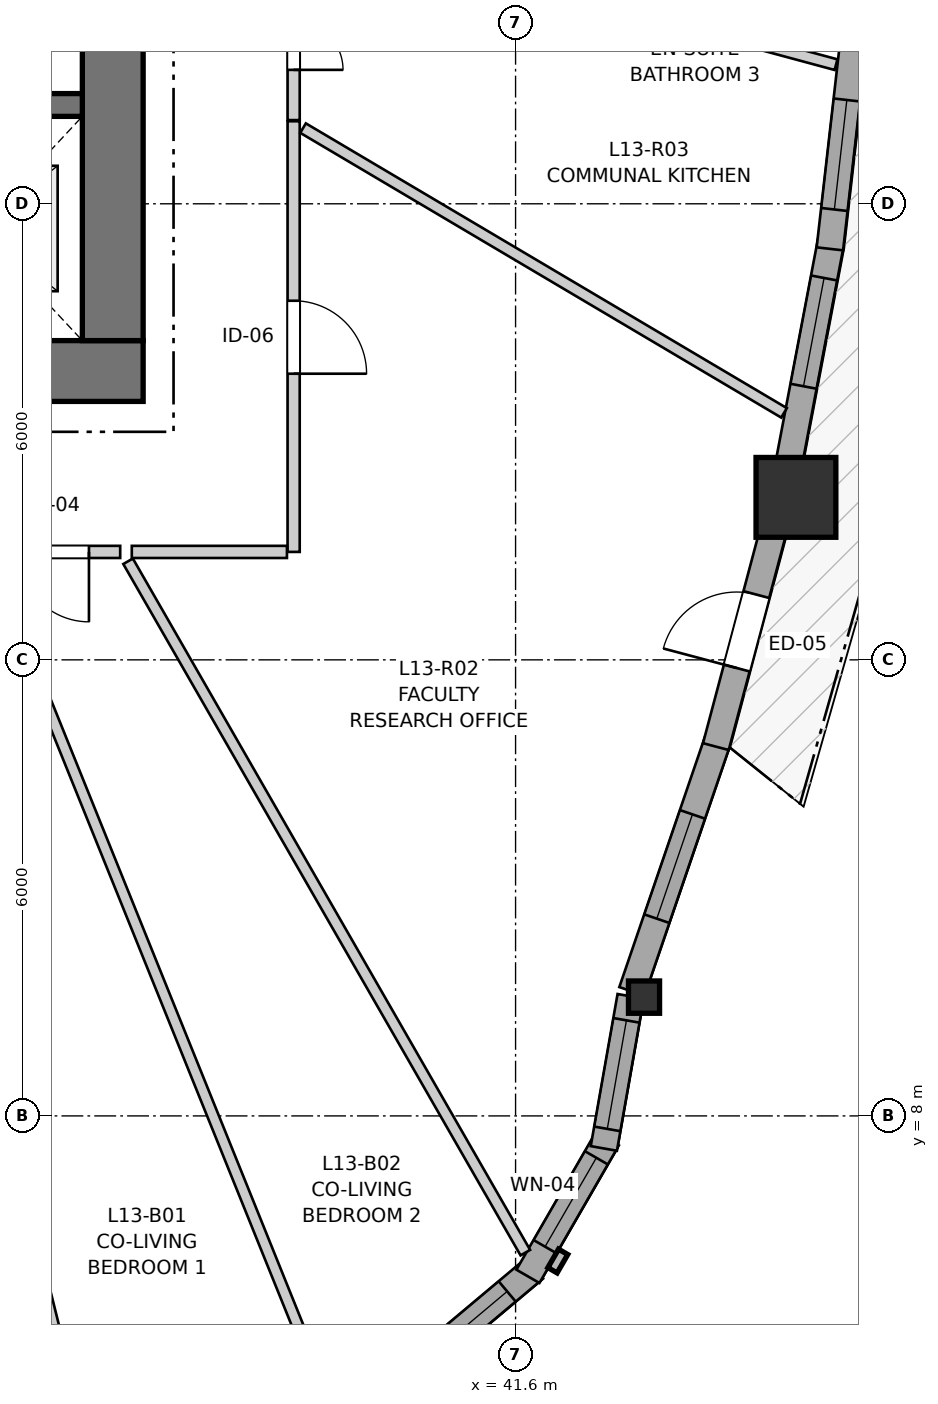
"""IFC4 building model, lengths in metres.
Left out: names, types, materials, properties, quantities, classifications, styles, units other than length and angle.
Written with IfcOpenShell. Run it as: python <this file> out.ifc"""

import sys

from ifc_helpers import new_model, si_unit, direction, frame, frame_2d, origin, origin_2d, place, context, subcontext, project, spatial, rectangle, i_section, extrude, source, transform, mapped, element, fill, save


model = new_model("IFC4")
c1 = context("Model", 3, precision=1e-05, world=origin(), true_north=direction((0.0, 1.0)))
c2 = subcontext(c1, "Body", "Model", "MODEL_VIEW")
j1 = project(units=[si_unit("LENGTHUNIT", "METRE"), si_unit("PLANEANGLEUNIT", "RADIAN")], contexts=[c1])
p1 = place(None, origin())
s1 = spatial("IfcSite", under=j1, at=p1, CompositionType="ELEMENT")
p2 = place(p1, origin())
s2 = spatial("IfcBuilding", under=s1, at=p2, CompositionType="ELEMENT")
p3 = place(p2, frame((0.0, 0.0, 46.2)))
s3 = spatial("IfcBuildingStorey", under=s2, at=p3, CompositionType="ELEMENT", Elevation=46.2)
p4 = place(p3, frame((24.0, 17.8, 0.0), z_axis=(0.0, 0.0, 1.0), x_axis=(1.0, 0.0, 0.0)))
e1 = element("IfcWall", 1, at=p4, inside=s3, PredefinedType="SHEAR", context=c2, shape_type="SweptSolid", body=[
    extrude(rectangle(XDim=12.7, YDim=0.8, at=frame_2d((6.35, 0.0))), origin(), (0.0, 0.0, 1.0), 2.94),
])
p5 = place(p3, frame((36.3, 18.2, 0.0), z_axis=(0.0, 0.0, 1.0), x_axis=(0.0, 1.0, 0.0)))
e2 = element("IfcWall", 2, at=p5, inside=s3, PredefinedType="SHEAR", context=c2, shape_type="SweptSolid", body=[
    extrude(rectangle(XDim=15.6, YDim=0.8, at=frame_2d((7.8, 0.0))), origin(), (0.0, 0.0, 1.0), 2.94),
])
p6 = place(p5, frame((4.25, 0.0, 0.0)))
e3 = element("IfcOpeningElement", 3, at=p6, cuts=e2, PredefinedType="OPENING", context=c2, shape_type="SweptSolid", body=[
    extrude(rectangle(XDim=1.1, YDim=2.15, at=frame_2d((0.55, 1.075))), frame((0.0, 0.41, 0.0), z_axis=(0.0, -1.0, 0.0), x_axis=(1.0, 0.0, 0.0)), (0.0, 0.0, 1.0), 0.82),
])
p7 = place(p5, frame((10.25, 0.0, 0.0)))
e4 = element("IfcOpeningElement", 4, at=p7, cuts=e2, PredefinedType="OPENING", context=c2, shape_type="SweptSolid", body=[
    extrude(rectangle(XDim=1.1, YDim=2.15, at=frame_2d((0.55, 1.075))), frame((0.0, 0.41, 0.0), z_axis=(0.0, -1.0, 0.0), x_axis=(1.0, 0.0, 0.0)), (0.0, 0.0, 1.0), 0.82),
])
p8 = place(p3, frame((24.8, 21.3, 0.0), z_axis=(0.0, 0.0, 1.0), x_axis=(1.0, 0.0, 0.0)))
e5 = element("IfcWall", 5, at=p8, inside=s3, PredefinedType="SHEAR", context=c2, shape_type="SweptSolid", body=[
    extrude(rectangle(XDim=11.1, YDim=0.3, at=frame_2d((5.55, 0.0))), origin(), (0.0, 0.0, 1.0), 2.94),
])
p9 = place(p8, frame((6.22, 0.0, 0.0)))
e6 = element("IfcOpeningElement", 6, at=p9, cuts=e5, PredefinedType="OPENING", context=c2, shape_type="SweptSolid", body=[
    extrude(rectangle(XDim=0.98, YDim=2.15, at=frame_2d((0.49, 1.075))), frame((0.0, 0.16, 0.0), z_axis=(0.0, -1.0, 0.0), x_axis=(1.0, 0.0, 0.0)), (0.0, 0.0, 1.0), 0.32),
])
p10 = place(p8, frame((9.15, 0.0, 0.0)))
e7 = element("IfcOpeningElement", 7, at=p10, cuts=e5, PredefinedType="OPENING", context=c2, shape_type="SweptSolid", body=[
    extrude(rectangle(XDim=1.15, YDim=2.15, at=frame_2d((0.575, 1.075))), frame((0.0, 0.16, 0.0), z_axis=(0.0, -1.0, 0.0), x_axis=(1.0, 0.0, 0.0)), (0.0, 0.0, 1.0), 0.32),
])
m1 = source(origin(), c2, "Body", "SweptSolid", [
    extrude(i_section(OverallWidth=0.409, OverallDepth=0.425, WebThickness=0.03, FlangeThickness=0.048, FilletRadius=0.015, at=origin_2d()), origin(), (0.0, 0.0, 1.0), 2.94),
])
p11 = place(p3, frame((43.29, 9.563, 0.0), z_axis=(0.0, 0.0, 1.0), x_axis=(1.0, 0.0, 0.0)))
e8 = element("IfcColumn", 8, at=p11, inside=s3, PredefinedType="PILASTER", context=c2, shape_type="MappedRepresentation", body=[
    mapped(m1, transform((0.0, 0.0, 0.0), x_axis=(1.0, 0.0, 0.0), y_axis=(0.0, 1.0, 0.0), z_axis=(0.0, 0.0, 1.0), scale=1.0)),
])
m2 = source(origin(), c2, "Body", "SweptSolid", [
    extrude(rectangle(XDim=1.05, YDim=1.05, at=origin_2d()), origin(), (0.0, 0.0, 1.0), 2.94),
])
p12 = place(p3, frame((45.289, 16.138, 0.0), z_axis=(0.0, 0.0, 1.0), x_axis=(1.0, 0.0, 0.0)))
e9 = element("IfcColumn", 9, at=p12, inside=s3, PredefinedType="COLUMN", context=c2, shape_type="MappedRepresentation", body=[
    mapped(m2, transform((0.0, 0.0, 0.0), x_axis=(1.0, 0.0, 0.0), y_axis=(0.0, 1.0, 0.0), z_axis=(0.0, 0.0, 1.0), scale=1.0)),
])
p13 = place(p3, frame((40.248, 4.649, 0.0), z_axis=(0.0, 0.0, 1.0), x_axis=(0.766024572719, 0.642811289563, 0.0)))
e10 = element("IfcWall", 10, at=p13, inside=s3, PredefinedType="SOLIDWALL", context=c2, shape_type="SweptSolid", body=[
    extrude(rectangle(XDim=2.09, YDim=0.35, at=frame_2d((1.045, 0.0))), origin(), (0.0, 0.0, 1.0), 2.42),
])
p14 = place(p13, frame((0.47, 0.0, 0.82)))
e11 = element("IfcOpeningElement", 11, at=p14, cuts=e10, PredefinedType="OPENING", context=c2, shape_type="SweptSolid", body=[
    extrude(rectangle(XDim=1.15, YDim=1.2, at=frame_2d((0.575, 0.6))), frame((0.0, 0.185, 0.0), z_axis=(0.0, -1.0, 0.0), x_axis=(1.0, 0.0, 0.0)), (0.0, 0.0, 1.0), 0.37),
])
p15 = place(p3, frame((41.762, 5.889, 0.0), z_axis=(0.0, 0.0, 1.0), x_axis=(0.500046000743, 0.865998843614, 0.0)))
e12 = element("IfcWall", 12, at=p15, inside=s3, PredefinedType="SOLIDWALL", context=c2, shape_type="SweptSolid", body=[
    extrude(rectangle(XDim=2.09, YDim=0.35, at=frame_2d((1.045, 0.0))), origin(), (0.0, 0.0, 1.0), 2.42),
])
p16 = place(p15, frame((0.451, 0.0, 0.82)))
e13 = element("IfcOpeningElement", 13, at=p16, cuts=e12, PredefinedType="OPENING", context=c2, shape_type="SweptSolid", body=[
    extrude(rectangle(XDim=1.35, YDim=1.45, at=frame_2d((0.675, 0.725))), frame((0.0, 0.185, 0.0), z_axis=(0.0, -1.0, 0.0), x_axis=(1.0, 0.0, 0.0)), (0.0, 0.0, 1.0), 0.37),
])
p17 = place(p3, frame((42.761, 7.572, 0.0), z_axis=(0.0, 0.0, 1.0), x_axis=(0.17370309897, 0.984798067326, 0.0)))
e14 = element("IfcWall", 14, at=p17, inside=s3, PredefinedType="SOLIDWALL", context=c2, shape_type="SweptSolid", body=[
    extrude(rectangle(XDim=2.032, YDim=0.35, at=frame_2d((1.016, 0.0))), origin(), (0.0, 0.0, 1.0), 2.42),
])
p18 = place(p17, frame((0.261, 0.0, 0.82)))
e15 = element("IfcOpeningElement", 15, at=p18, cuts=e14, PredefinedType="OPENING", context=c2, shape_type="SweptSolid", body=[
    extrude(rectangle(XDim=1.45, YDim=1.25, at=frame_2d((0.725, 0.625))), frame((0.0, 0.185, 0.0), z_axis=(0.0, -1.0, 0.0), x_axis=(1.0, 0.0, 0.0)), (0.0, 0.0, 1.0), 0.37),
])
p19 = place(p3, frame((43.131, 9.638, 0.0), z_axis=(0.0, 0.0, 1.0), x_axis=(0.32360039121, 0.94619384209, 0.0)))
e16 = element("IfcWall", 16, at=p19, inside=s3, PredefinedType="SOLIDWALL", context=c2, shape_type="SweptSolid", body=[
    extrude(rectangle(XDim=3.492, YDim=0.35, at=frame_2d((1.746, 0.0))), origin(), (0.0, 0.0, 1.0), 2.42),
])
p20 = place(p19, frame((1.011, 0.0, 0.82)))
e17 = element("IfcOpeningElement", 17, at=p20, cuts=e16, PredefinedType="OPENING", context=c2, shape_type="SweptSolid", body=[
    extrude(rectangle(XDim=1.45, YDim=1.25, at=frame_2d((0.725, 0.625))), frame((0.0, 0.185, 0.0), z_axis=(0.0, -1.0, 0.0), x_axis=(1.0, 0.0, 0.0)), (0.0, 0.0, 1.0), 0.37),
])
p21 = place(p3, frame((44.235, 12.859, 0.0), z_axis=(0.0, 0.0, 1.0), x_axis=(0.257072148239, 0.966392213648, 0.0)))
e18 = element("IfcWall", 18, at=p21, inside=s3, PredefinedType="SOLIDWALL", context=c2, shape_type="SweptSolid", body=[
    extrude(rectangle(XDim=3.14, YDim=0.35, at=frame_2d((1.57, 0.0))), origin(), (0.0, 0.0, 1.0), 2.42),
])
p22 = place(p21, frame((1.07, 0.0, 0.0)))
e19 = element("IfcOpeningElement", 19, at=p22, cuts=e18, PredefinedType="OPENING", context=c2, shape_type="SweptSolid", body=[
    extrude(rectangle(XDim=1.0, YDim=2.1, at=frame_2d((0.5, 1.05))), frame((0.0, 0.185, 0.0), z_axis=(0.0, -1.0, 0.0), x_axis=(1.0, 0.0, 0.0)), (0.0, 0.0, 1.0), 0.37),
])
p23 = place(p3, frame((45.173, 16.465, 0.0), z_axis=(0.0, 0.0, 1.0), x_axis=(0.186653769851, 0.982425758111, 0.0)))
e20 = element("IfcWall", 20, at=p23, inside=s3, PredefinedType="SOLIDWALL", context=c2, shape_type="SweptSolid", body=[
    extrude(rectangle(XDim=3.084, YDim=0.35, at=frame_2d((1.542, 0.0))), origin(), (0.0, 0.0, 1.0), 2.42),
])
p24 = place(p23, frame((1.155, 0.0, 0.82)))
e21 = element("IfcOpeningElement", 21, at=p24, cuts=e20, PredefinedType="OPENING", context=c2, shape_type="SweptSolid", body=[
    extrude(rectangle(XDim=1.45, YDim=1.25, at=frame_2d((0.725, 0.625))), frame((0.0, 0.185, 0.0), z_axis=(0.0, -1.0, 0.0), x_axis=(1.0, 0.0, 0.0)), (0.0, 0.0, 1.0), 0.37),
])
p25 = place(p3, frame((45.735, 19.407, 0.0), z_axis=(0.0, 0.0, 1.0), x_axis=(0.113314766684, 0.993559139484, 0.0)))
e22 = element("IfcWall", 22, at=p25, inside=s3, PredefinedType="SOLIDWALL", context=c2, shape_type="SweptSolid", body=[
    extrude(rectangle(XDim=3.327, YDim=0.35, at=frame_2d((1.663, 0.0))), origin(), (0.0, 0.0, 1.0), 2.42),
])
p26 = place(p25, frame((0.521, 0.0, 0.82)))
e23 = element("IfcOpeningElement", 23, at=p26, cuts=e22, PredefinedType="OPENING", context=c2, shape_type="SweptSolid", body=[
    extrude(rectangle(XDim=1.45, YDim=1.25, at=frame_2d((0.725, 0.625))), frame((0.0, 0.185, 0.0), z_axis=(0.0, -1.0, 0.0), x_axis=(1.0, 0.0, 0.0)), (0.0, 0.0, 1.0), 0.37),
])
p27 = place(p3, frame((38.68, 21.086, 0.0), z_axis=(0.0, 0.0, 1.0), x_axis=(0.0, -1.0, 0.0)))
e24 = element("IfcWall", 24, at=p27, inside=s3, PredefinedType="PARTITIONING", context=c2, shape_type="SweptSolid", body=[
    extrude(rectangle(XDim=5.666, YDim=0.16, at=frame_2d((2.833, 0.0))), origin(), (0.0, 0.0, 1.0), 2.94),
])
p28 = place(p27, frame((2.362, 0.0, 0.0)))
e25 = element("IfcOpeningElement", 25, at=p28, cuts=e24, PredefinedType="OPENING", context=c2, shape_type="SweptSolid", body=[
    extrude(rectangle(XDim=0.96, YDim=2.1, at=frame_2d((0.48, 1.05))), frame((0.0, 0.09, 0.0), z_axis=(0.0, -1.0, 0.0), x_axis=(1.0, 0.0, 0.0)), (0.0, 0.0, 1.0), 0.18),
])
p29 = place(p3, frame((38.68, 23.77, 0.0), z_axis=(0.0, 0.0, 1.0), x_axis=(0.0, -1.0, 0.0)))
e26 = element("IfcWall", 26, at=p29, inside=s3, PredefinedType="PARTITIONING", context=c2, shape_type="SweptSolid", body=[
    extrude(rectangle(XDim=2.669, YDim=0.16, at=frame_2d((1.334, 0.0))), origin(), (0.0, 0.0, 1.0), 2.94),
])
p30 = place(p29, frame((0.708, 0.0, 0.0)))
e27 = element("IfcOpeningElement", 27, at=p30, cuts=e26, PredefinedType="OPENING", context=c2, shape_type="SweptSolid", body=[
    extrude(rectangle(XDim=1.3, YDim=2.1, at=frame_2d((0.65, 1.05))), frame((0.0, 0.09, 0.0), z_axis=(0.0, -1.0, 0.0), x_axis=(1.0, 0.0, 0.0)), (0.0, 0.0, 1.0), 0.18),
])
p31 = place(p3, frame((36.398, 15.42, 0.0), z_axis=(0.0, 0.0, 1.0), x_axis=(-1.0, 0.0, 0.0)))
e28 = element("IfcWall", 28, at=p31, inside=s3, PredefinedType="PARTITIONING", context=c2, shape_type="SweptSolid", body=[
    extrude(rectangle(XDim=1.792, YDim=0.16, at=frame_2d((0.896, 0.0))), origin(), (0.0, 0.0, 1.0), 2.94),
])
p32 = place(p31, frame((0.411, 0.0, 0.0)))
e29 = element("IfcOpeningElement", 29, at=p32, cuts=e28, PredefinedType="OPENING", context=c2, shape_type="SweptSolid", body=[
    extrude(rectangle(XDim=0.92, YDim=2.1, at=frame_2d((0.46, 1.05))), frame((0.0, 0.09, 0.0), z_axis=(0.0, -1.0, 0.0), x_axis=(1.0, 0.0, 0.0)), (0.0, 0.0, 1.0), 0.18),
])
p33 = place(p3, frame((34.669, 15.305, 0.0), z_axis=(0.0, 0.0, 1.0), x_axis=(0.374459605158, -0.927243228126, 0.0)))
e30 = element("IfcWall", 30, at=p33, inside=s3, PredefinedType="PARTITIONING", context=c2, shape_type="SweptSolid", body=[
    extrude(rectangle(XDim=11.719, YDim=0.145, at=frame_2d((5.86, 0.0))), origin(), (0.0, 0.0, 1.0), 2.94),
])
p34 = place(p3, frame((33.011, 15.315, 0.0), z_axis=(0.0, 0.0, 1.0), x_axis=(0.241616400535, -0.970371843673, 0.0)))
e31 = element("IfcWall", 31, at=p34, inside=s3, PredefinedType="PARTITIONING", context=c2, shape_type="SweptSolid", body=[
    extrude(rectangle(XDim=11.125, YDim=0.145, at=frame_2d((5.562, 0.0))), origin(), (0.0, 0.0, 1.0), 2.94),
])
p35 = place(p3, frame((36.502, 15.297, 0.0), z_axis=(0.0, 0.0, 1.0), x_axis=(0.498240240214, -0.867039020478, 0.0)))
e32 = element("IfcWall", 32, at=p35, inside=s3, PredefinedType="PARTITIONING", context=c2, shape_type="SweptSolid", body=[
    extrude(rectangle(XDim=10.49, YDim=0.145, at=frame_2d((5.245, 0.0))), origin(), (0.0, 0.0, 1.0), 2.94),
])
p36 = place(p3, frame((38.804, 20.996, 0.0), z_axis=(0.0, 0.0, 1.0), x_axis=(0.860541640281, -0.509380099084, 0.0)))
e33 = element("IfcWall", 33, at=p36, inside=s3, PredefinedType="PARTITIONING", context=c2, shape_type="SweptSolid", body=[
    extrude(rectangle(XDim=7.354, YDim=0.145, at=frame_2d((3.677, 0.0))), origin(), (0.0, 0.0, 1.0), 2.94),
])
p37 = place(p3, frame((36.551, 15.42, 0.0), z_axis=(0.0, 0.0, 1.0), x_axis=(1.0, 0.0, 0.0)))
e34 = element("IfcWall", 34, at=p37, inside=s3, PredefinedType="PARTITIONING", context=c2, shape_type="SweptSolid", body=[
    extrude(rectangle(XDim=2.042, YDim=0.16, at=frame_2d((1.021, 0.0))), origin(), (0.0, 0.0, 1.0), 2.94),
])
p38 = place(p3, frame((44.305, 22.238, 0.0), z_axis=(0.0, 0.0, 1.0), x_axis=(0.96544085657, -0.260622240925, 0.0)))
e35 = element("IfcWall", 35, at=p38, inside=s3, PredefinedType="PARTITIONING", context=c2, shape_type="SweptSolid", body=[
    extrude(rectangle(XDim=1.565, YDim=0.145, at=frame_2d((0.783, 0.0))), origin(), (0.0, 0.0, 1.0), 2.94),
])
m3 = source(origin(), c2, "Body", "SweptSolid", [
    extrude(rectangle(XDim=1.15, YDim=1.2, at=frame_2d((0.575, 0.6))), frame((0.0, 0.03, 0.0), z_axis=(0.0, -1.0, 0.0), x_axis=(1.0, 0.0, 0.0)), (0.0, 0.0, 1.0), 0.06),
])
p39 = place(p14, origin())
e36 = element("IfcWindow", 36, at=p39, inside=s3, PartitioningType="SINGLE_PANEL", PredefinedType="WINDOW", context=c2, shape_type="MappedRepresentation", body=[
    mapped(m3, transform((0.0, 0.0, 0.0), x_axis=(1.0, 0.0, 0.0), y_axis=(0.0, 1.0, 0.0), z_axis=(0.0, 0.0, 1.0), scale=1.0)),
])
fill(e11, e36)
m4 = source(origin(), c2, "Body", "SweptSolid", [
    extrude(rectangle(XDim=1.35, YDim=1.45, at=frame_2d((0.675, 0.725))), frame((0.0, 0.03, 0.0), z_axis=(0.0, -1.0, 0.0), x_axis=(1.0, 0.0, 0.0)), (0.0, 0.0, 1.0), 0.06),
])
p40 = place(p16, origin())
e37 = element("IfcWindow", 37, at=p40, inside=s3, PartitioningType="SINGLE_PANEL", PredefinedType="WINDOW", context=c2, shape_type="MappedRepresentation", body=[
    mapped(m4, transform((0.0, 0.0, 0.0), x_axis=(1.0, 0.0, 0.0), y_axis=(0.0, 1.0, 0.0), z_axis=(0.0, 0.0, 1.0), scale=1.0)),
])
fill(e13, e37)
m5 = source(origin(), c2, "Body", "SweptSolid", [
    extrude(rectangle(XDim=1.45, YDim=1.25, at=frame_2d((0.725, 0.625))), frame((0.0, 0.03, 0.0), z_axis=(0.0, -1.0, 0.0), x_axis=(1.0, 0.0, 0.0)), (0.0, 0.0, 1.0), 0.06),
])
p41 = place(p18, origin())
e38 = element("IfcWindow", 38, at=p41, inside=s3, PartitioningType="SINGLE_PANEL", PredefinedType="WINDOW", context=c2, shape_type="MappedRepresentation", body=[
    mapped(m5, transform((0.0, 0.0, 0.0), x_axis=(1.0, 0.0, 0.0), y_axis=(0.0, 1.0, 0.0), z_axis=(0.0, 0.0, 1.0), scale=1.0)),
])
fill(e15, e38)
p42 = place(p20, origin())
e39 = element("IfcWindow", 39, at=p42, inside=s3, PartitioningType="SINGLE_PANEL", PredefinedType="WINDOW", context=c2, shape_type="MappedRepresentation", body=[
    mapped(m5, transform((0.0, 0.0, 0.0), x_axis=(1.0, 0.0, 0.0), y_axis=(0.0, 1.0, 0.0), z_axis=(0.0, 0.0, 1.0), scale=1.0)),
])
fill(e17, e39)
p43 = place(p24, origin())
e40 = element("IfcWindow", 40, at=p43, inside=s3, PartitioningType="SINGLE_PANEL", PredefinedType="WINDOW", context=c2, shape_type="MappedRepresentation", body=[
    mapped(m5, transform((0.0, 0.0, 0.0), x_axis=(1.0, 0.0, 0.0), y_axis=(0.0, 1.0, 0.0), z_axis=(0.0, 0.0, 1.0), scale=1.0)),
])
fill(e21, e40)
p44 = place(p26, origin())
e41 = element("IfcWindow", 41, at=p44, inside=s3, PartitioningType="SINGLE_PANEL", PredefinedType="WINDOW", context=c2, shape_type="MappedRepresentation", body=[
    mapped(m5, transform((0.0, 0.0, 0.0), x_axis=(1.0, 0.0, 0.0), y_axis=(0.0, 1.0, 0.0), z_axis=(0.0, 0.0, 1.0), scale=1.0)),
])
fill(e23, e41)
m6 = source(origin(), c2, "Body", "SweptSolid", [
    extrude(rectangle(XDim=1.0, YDim=2.1, at=frame_2d((0.5, 1.05))), frame((0.0, 0.025, 0.0), z_axis=(0.0, -1.0, 0.0), x_axis=(1.0, 0.0, 0.0)), (0.0, 0.0, 1.0), 0.05),
])
p45 = place(p22, origin())
e42 = element("IfcDoor", 42, at=p45, inside=s3, OperationType="SINGLE_SWING_LEFT", PredefinedType="DOOR", context=c2, shape_type="MappedRepresentation", body=[
    mapped(m6, transform((0.0, 0.0, 0.0), x_axis=(1.0, 0.0, 0.0), y_axis=(0.0, 1.0, 0.0), z_axis=(0.0, 0.0, 1.0), scale=1.0)),
])
fill(e19, e42)
m7 = source(origin(), c2, "Body", "SweptSolid", [
    extrude(rectangle(XDim=0.96, YDim=2.1, at=frame_2d((0.48, 1.05))), frame((0.0, 0.025, 0.0), z_axis=(0.0, -1.0, 0.0), x_axis=(1.0, 0.0, 0.0)), (0.0, 0.0, 1.0), 0.05),
])
p46 = place(p28, origin())
e43 = element("IfcDoor", 43, at=p46, inside=s3, OperationType="SINGLE_SWING_RIGHT", PredefinedType="DOOR", context=c2, shape_type="MappedRepresentation", body=[
    mapped(m7, transform((0.0, 0.0, 0.0), x_axis=(1.0, 0.0, 0.0), y_axis=(0.0, 1.0, 0.0), z_axis=(0.0, 0.0, 1.0), scale=1.0)),
])
fill(e25, e43)
m8 = source(origin(), c2, "Body", "SweptSolid", [
    extrude(rectangle(XDim=1.3, YDim=2.1, at=frame_2d((0.65, 1.05))), frame((0.0, 0.025, 0.0), z_axis=(0.0, -1.0, 0.0), x_axis=(1.0, 0.0, 0.0)), (0.0, 0.0, 1.0), 0.05),
])
p47 = place(p30, origin())
e44 = element("IfcDoor", 44, at=p47, inside=s3, OperationType="DOUBLE_DOOR_SINGLE_SWING", PredefinedType="DOOR", context=c2, shape_type="MappedRepresentation", body=[
    mapped(m8, transform((0.0, 0.0, 0.0), x_axis=(1.0, 0.0, 0.0), y_axis=(0.0, 1.0, 0.0), z_axis=(0.0, 0.0, 1.0), scale=1.0)),
])
fill(e27, e44)
m9 = source(origin(), c2, "Body", "SweptSolid", [
    extrude(rectangle(XDim=0.92, YDim=2.1, at=frame_2d((0.46, 1.05))), frame((0.0, 0.025, 0.0), z_axis=(0.0, -1.0, 0.0), x_axis=(1.0, 0.0, 0.0)), (0.0, 0.0, 1.0), 0.05),
])
p48 = place(p32, origin())
e45 = element("IfcDoor", 45, at=p48, inside=s3, OperationType="SINGLE_SWING_LEFT", PredefinedType="DOOR", context=c2, shape_type="MappedRepresentation", body=[
    mapped(m9, transform((0.0, 0.0, 0.0), x_axis=(1.0, 0.0, 0.0), y_axis=(0.0, 1.0, 0.0), z_axis=(0.0, 0.0, 1.0), scale=1.0)),
])
fill(e29, e45)
save(model, sys.argv[1])
